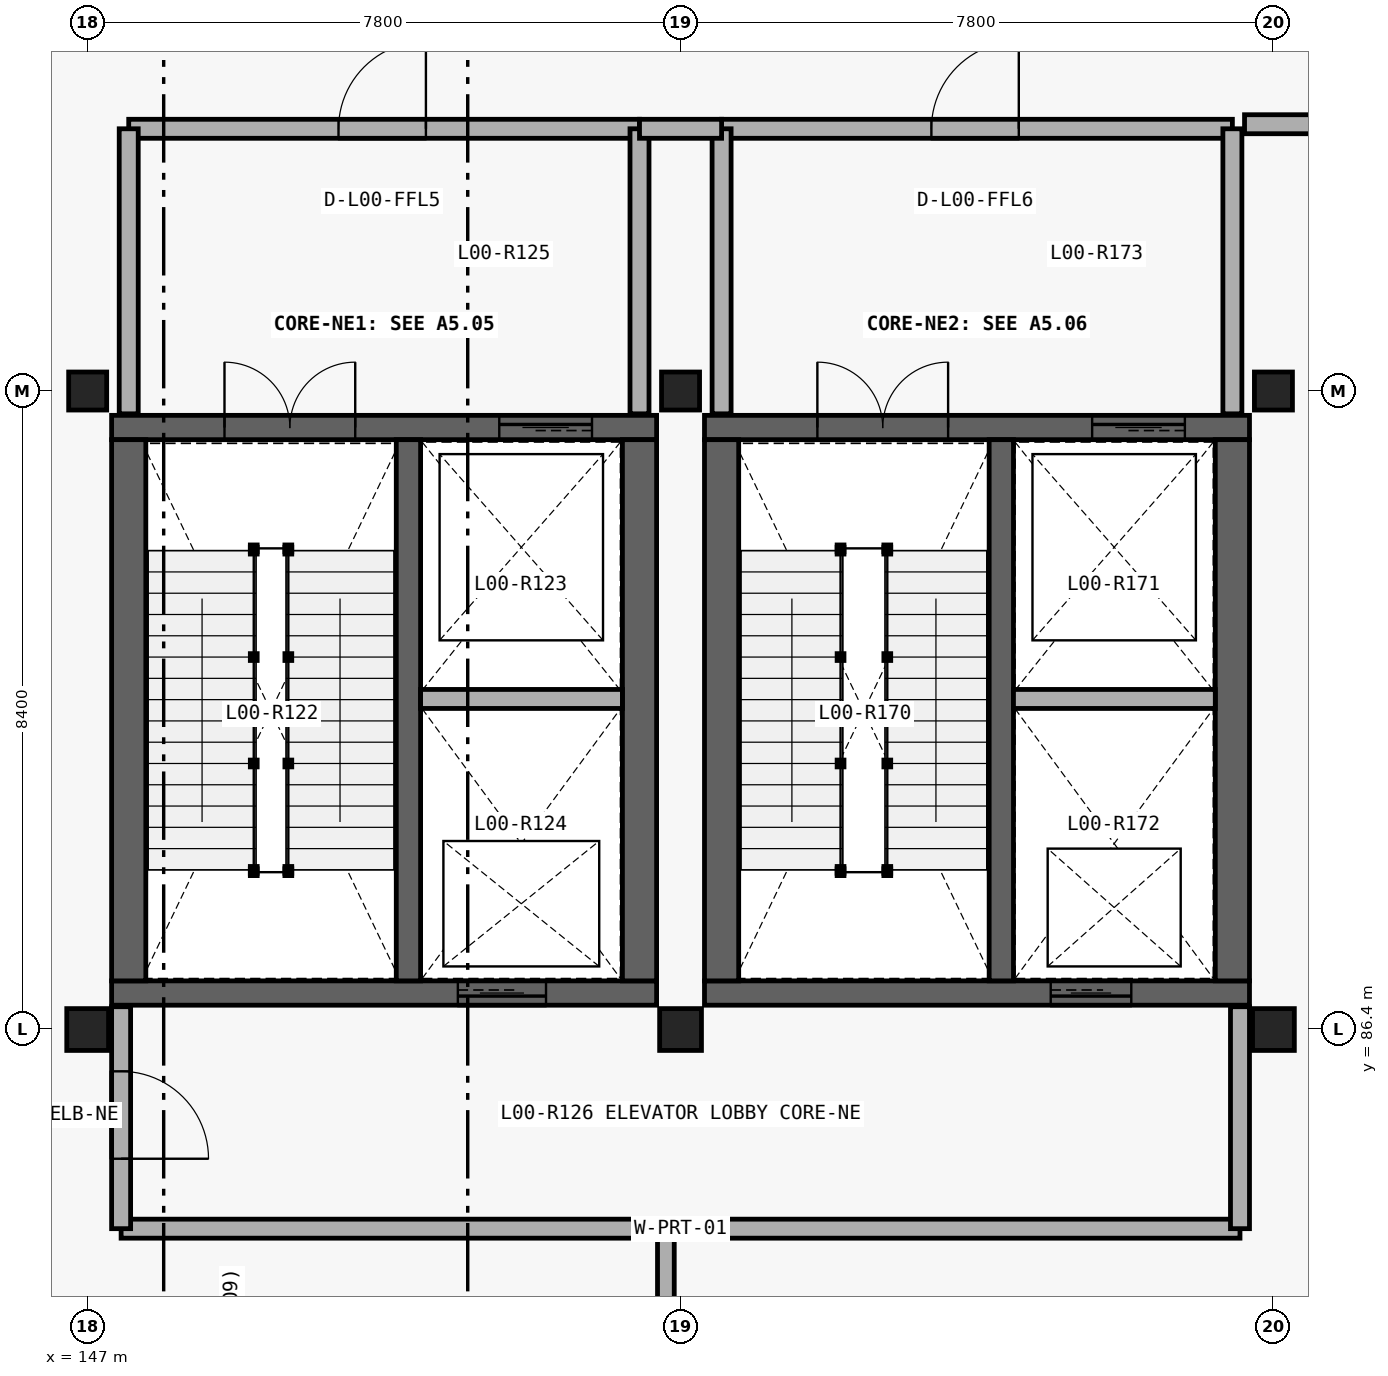
"""IFC4 building model, lengths in metres.
Left out: names, types, materials, properties, quantities, classifications, styles, units other than length and angle.
Written with IfcOpenShell. Run it as: python <this file> out.ifc"""

import sys

from ifc_helpers import new_model, si_unit, direction, frame, frame_2d, origin_with_axes, origin_2d_with_axis, place, context, subcontext, project, spatial, rectangle, i_section, extrude, element, fill, save


model = new_model("IFC4")
c1 = context("Model", 3, precision=1e-05, world=origin_with_axes(), true_north=direction((0.0, 1.0)))
c2 = subcontext(c1, "Body", "Model", "MODEL_VIEW")
j1 = project(units=[si_unit("LENGTHUNIT", "METRE"), si_unit("PLANEANGLEUNIT", "RADIAN")], contexts=[c1])
p1 = place(None, origin_with_axes())
s1 = spatial("IfcSite", under=j1, at=p1, CompositionType="ELEMENT")
p2 = place(p1, origin_with_axes())
s2 = spatial("IfcBuilding", under=s1, at=p2, CompositionType="ELEMENT")
p3 = place(p2, origin_with_axes())
s3 = spatial("IfcBuildingStorey", under=s2, at=p3, CompositionType="ELEMENT", Elevation=0.0)
p4 = place(None, frame((147.315, 86.88, 0.0), z_axis=(0.0, 0.0, 1.0), x_axis=(1.0, 0.0, 0.0)))
e1 = element("IfcWall", 1, at=p4, inside=s3, PredefinedType="SHEAR", context=c2, shape_type="SweptSolid", body=[
    extrude(rectangle(XDim=7.17, YDim=0.32, at=frame_2d((3.585, 0.0), x_axis=(1.0, 0.0))), origin_with_axes(), (0.0, 0.0, 1.0), 5.4),
])
p5 = place(None, frame((152.45, 86.88, 0.0), z_axis=(0.0, 0.0, 1.0), x_axis=(1.0, 0.0, 0.0)))
e2 = element("IfcOpeningElement", 2, at=p5, cuts=e1, PredefinedType="OPENING", context=c2, shape_type="SweptSolid", body=[
    extrude(rectangle(XDim=1.16, YDim=2.2, at=frame_2d((0.0, 1.1), x_axis=(1.0, 0.0))), frame((0.0, 0.17, 0.0), z_axis=(0.0, -1.0, 0.0), x_axis=(1.0, 0.0, 0.0)), (0.0, 0.0, 1.0), 0.34),
])
p6 = place(None, frame((154.485, 94.32, 0.0), z_axis=(0.0, 0.0, 1.0), x_axis=(-1.0, 0.0, 0.0)))
e3 = element("IfcWall", 3, at=p6, inside=s3, PredefinedType="SHEAR", context=c2, shape_type="SweptSolid", body=[
    extrude(rectangle(XDim=7.17, YDim=0.32, at=frame_2d((3.585, 0.0), x_axis=(1.0, 0.0))), origin_with_axes(), (0.0, 0.0, 1.0), 5.4),
])
p7 = place(None, frame((149.66, 94.32, 0.0), z_axis=(0.0, 0.0, 1.0), x_axis=(-1.0, 0.0, 0.0)))
e4 = element("IfcOpeningElement", 4, at=p7, cuts=e3, PredefinedType="OPENING", context=c2, shape_type="SweptSolid", body=[
    extrude(rectangle(XDim=1.72, YDim=2.18, at=frame_2d((0.0, 1.09), x_axis=(1.0, 0.0))), frame((0.0, 0.17, 0.0), z_axis=(0.0, -1.0, 0.0), x_axis=(1.0, 0.0, 0.0)), (0.0, 0.0, 1.0), 0.34),
])
p8 = place(None, frame((153.025, 94.32, 0.0), z_axis=(0.0, 0.0, 1.0), x_axis=(-1.0, 0.0, 0.0)))
e5 = element("IfcOpeningElement", 5, at=p8, cuts=e3, PredefinedType="OPENING", context=c2, shape_type="SweptSolid", body=[
    extrude(rectangle(XDim=1.22, YDim=2.28, at=frame_2d((0.0, 1.14), x_axis=(1.0, 0.0))), frame((0.0, 0.17, 0.0), z_axis=(0.0, -1.0, 0.0), x_axis=(1.0, 0.0, 0.0)), (0.0, 0.0, 1.0), 0.34),
])
for number, where, z_axis, x_axis in (
    (6, (154.26, 87.04, 0.0), (0.0, 0.0, 1.0), (0.0, 1.0, 0.0)),
    (7, (147.54, 94.16, 0.0), (0.0, 0.0, 1.0), (0.0, -1.0, 0.0)),
):
    element("IfcWall", number, at=place(None, frame(where, z_axis=z_axis, x_axis=x_axis)), inside=s3, PredefinedType="SHEAR", context=c2, shape_type="SweptSolid", body=[
        extrude(rectangle(XDim=7.12, YDim=0.45, at=frame_2d((3.56, 0.0), x_axis=(1.0, 0.0))), origin_with_axes(), (0.0, 0.0, 1.0), 5.4),
    ])
p9 = place(None, frame((151.22, 87.04, 0.0), z_axis=(0.0, 0.0, 1.0), x_axis=(0.0, 1.0, 0.0)))
e8 = element("IfcWall", 8, at=p9, inside=s3, PredefinedType="SHEAR", context=c2, shape_type="SweptSolid", body=[
    extrude(rectangle(XDim=7.12, YDim=0.32, at=frame_2d((3.56, 0.0), x_axis=(1.0, 0.0))), origin_with_axes(), (0.0, 0.0, 1.0), 5.4),
])
p10 = place(None, frame((151.38, 90.749, 0.0), z_axis=(0.0, 0.0, 1.0), x_axis=(1.0, 0.0, 0.0)))
e9 = element("IfcWall", 9, at=p10, inside=s3, PredefinedType="PARTITIONING", context=c2, shape_type="SweptSolid", body=[
    extrude(rectangle(XDim=2.655, YDim=0.25, at=frame_2d((1.327, 0.0), x_axis=(1.0, 0.0))), origin_with_axes(), (0.0, 0.0, 1.0), 5.08),
])
p11 = place(None, frame((154.26, 98.25, 0.0), z_axis=(0.0, 0.0, 1.0), x_axis=(-1.0, 0.0, 0.0)))
e10 = element("IfcWall", 10, at=p11, inside=s3, PredefinedType="PARTITIONING", context=c2, shape_type="SweptSolid", body=[
    extrude(rectangle(XDim=6.72, YDim=0.25, at=frame_2d((3.36, 0.0), x_axis=(1.0, 0.0))), origin_with_axes(), (0.0, 0.0, 1.0), 5.08),
])
p12 = place(None, frame((150.875, 98.25, 0.0), z_axis=(0.0, 0.0, 1.0), x_axis=(-1.0, 0.0, 0.0)))
e11 = element("IfcOpeningElement", 11, at=p12, cuts=e10, PredefinedType="OPENING", context=c2, shape_type="SweptSolid", body=[
    extrude(rectangle(XDim=1.15, YDim=2.25, at=frame_2d((0.0, 1.125), x_axis=(1.0, 0.0))), frame((0.0, 0.135, 0.0), z_axis=(0.0, -1.0, 0.0), x_axis=(1.0, 0.0, 0.0)), (0.0, 0.0, 1.0), 0.27),
])
for number, where, z_axis, x_axis in (
    (12, (147.54, 94.5, 0.0), (0.0, 0.0, 1.0), (0.0, 1.0, 0.0)),
    (13, (154.26, 94.5, 0.0), (0.0, 0.0, 1.0), (0.0, 1.0, 0.0)),
):
    element("IfcWall", number, at=place(None, frame(where, z_axis=z_axis, x_axis=x_axis)), inside=s3, PredefinedType="PARTITIONING", context=c2, shape_type="SweptSolid", body=[
        extrude(rectangle(XDim=3.75, YDim=0.25, at=frame_2d((1.875, 0.0), x_axis=(1.0, 0.0))), origin_with_axes(), (0.0, 0.0, 1.0), 5.08),
    ])
p13 = place(None, frame((147.44, 83.78, 0.0), z_axis=(0.0, 0.0, 1.0), x_axis=(1.0, 0.0, 0.0)))
e14 = element("IfcWall", 14, at=p13, inside=s3, PredefinedType="PARTITIONING", context=c2, shape_type="SweptSolid", body=[
    extrude(rectangle(XDim=14.72, YDim=0.25, at=frame_2d((7.36, 0.0), x_axis=(1.0, 0.0))), origin_with_axes(), (0.0, 0.0, 1.0), 4.732),
])
p14 = place(None, frame((162.16, 83.78, 0.0), z_axis=(0.0, 0.0, 1.0), x_axis=(0.0, 1.0, 0.0)))
e15 = element("IfcWall", 15, at=p14, inside=s3, PredefinedType="PARTITIONING", context=c2, shape_type="SweptSolid", body=[
    extrude(rectangle(XDim=2.92, YDim=0.25, at=frame_2d((1.46, 0.0), x_axis=(1.0, 0.0))), origin_with_axes(), (0.0, 0.0, 1.0), 5.08),
])
p15 = place(None, frame((147.44, 86.7, 0.0), z_axis=(0.0, 0.0, 1.0), x_axis=(0.0, -1.0, 0.0)))
e16 = element("IfcWall", 16, at=p15, inside=s3, PredefinedType="PARTITIONING", context=c2, shape_type="SweptSolid", body=[
    extrude(rectangle(XDim=2.92, YDim=0.25, at=frame_2d((1.46, 0.0), x_axis=(1.0, 0.0))), origin_with_axes(), (0.0, 0.0, 1.0), 5.08),
])
p16 = place(None, frame((147.44, 85.275, 0.0), z_axis=(0.0, 0.0, 1.0), x_axis=(0.0, -1.0, 0.0)))
e17 = element("IfcOpeningElement", 17, at=p16, cuts=e16, PredefinedType="OPENING", context=c2, shape_type="SweptSolid", body=[
    extrude(rectangle(XDim=1.15, YDim=2.25, at=frame_2d((0.0, 1.125), x_axis=(1.0, 0.0))), frame((0.0, 0.135, 0.0), z_axis=(0.0, -1.0, 0.0), x_axis=(1.0, 0.0, 0.0)), (0.0, 0.0, 1.0), 0.27),
])
p17 = place(None, frame((155.115, 86.88, 0.0), z_axis=(0.0, 0.0, 1.0), x_axis=(1.0, 0.0, 0.0)))
e18 = element("IfcWall", 18, at=p17, inside=s3, PredefinedType="SHEAR", context=c2, shape_type="SweptSolid", body=[
    extrude(rectangle(XDim=7.17, YDim=0.32, at=frame_2d((3.585, 0.0), x_axis=(1.0, 0.0))), origin_with_axes(), (0.0, 0.0, 1.0), 5.4),
])
p18 = place(None, frame((160.2, 86.88, 0.0), z_axis=(0.0, 0.0, 1.0), x_axis=(1.0, 0.0, 0.0)))
e19 = element("IfcOpeningElement", 19, at=p18, cuts=e18, PredefinedType="OPENING", context=c2, shape_type="SweptSolid", body=[
    extrude(rectangle(XDim=1.06, YDim=2.16, at=frame_2d((0.0, 1.08), x_axis=(1.0, 0.0))), frame((0.0, 0.17, 0.0), z_axis=(0.0, -1.0, 0.0), x_axis=(1.0, 0.0, 0.0)), (0.0, 0.0, 1.0), 0.34),
])
p19 = place(None, frame((162.285, 94.32, 0.0), z_axis=(0.0, 0.0, 1.0), x_axis=(-1.0, 0.0, 0.0)))
e20 = element("IfcWall", 20, at=p19, inside=s3, PredefinedType="SHEAR", context=c2, shape_type="SweptSolid", body=[
    extrude(rectangle(XDim=7.17, YDim=0.32, at=frame_2d((3.585, 0.0), x_axis=(1.0, 0.0))), origin_with_axes(), (0.0, 0.0, 1.0), 5.4),
])
p20 = place(None, frame((157.46, 94.32, 0.0), z_axis=(0.0, 0.0, 1.0), x_axis=(-1.0, 0.0, 0.0)))
e21 = element("IfcOpeningElement", 21, at=p20, cuts=e20, PredefinedType="OPENING", context=c2, shape_type="SweptSolid", body=[
    extrude(rectangle(XDim=1.72, YDim=2.18, at=frame_2d((0.0, 1.09), x_axis=(1.0, 0.0))), frame((0.0, 0.17, 0.0), z_axis=(0.0, -1.0, 0.0), x_axis=(1.0, 0.0, 0.0)), (0.0, 0.0, 1.0), 0.34),
])
p21 = place(None, frame((160.825, 94.32, 0.0), z_axis=(0.0, 0.0, 1.0), x_axis=(-1.0, 0.0, 0.0)))
e22 = element("IfcOpeningElement", 22, at=p21, cuts=e20, PredefinedType="OPENING", context=c2, shape_type="SweptSolid", body=[
    extrude(rectangle(XDim=1.22, YDim=2.28, at=frame_2d((0.0, 1.14), x_axis=(1.0, 0.0))), frame((0.0, 0.17, 0.0), z_axis=(0.0, -1.0, 0.0), x_axis=(1.0, 0.0, 0.0)), (0.0, 0.0, 1.0), 0.34),
])
for number, where, z_axis, x_axis in (
    (23, (162.06, 87.04, 0.0), (0.0, 0.0, 1.0), (0.0, 1.0, 0.0)),
    (24, (155.34, 94.16, 0.0), (0.0, 0.0, 1.0), (0.0, -1.0, 0.0)),
):
    element("IfcWall", number, at=place(None, frame(where, z_axis=z_axis, x_axis=x_axis)), inside=s3, PredefinedType="SHEAR", context=c2, shape_type="SweptSolid", body=[
        extrude(rectangle(XDim=7.12, YDim=0.45, at=frame_2d((3.56, 0.0), x_axis=(1.0, 0.0))), origin_with_axes(), (0.0, 0.0, 1.0), 5.4),
    ])
p22 = place(None, frame((159.02, 87.04, 0.0), z_axis=(0.0, 0.0, 1.0), x_axis=(0.0, 1.0, 0.0)))
e25 = element("IfcWall", 25, at=p22, inside=s3, PredefinedType="SHEAR", context=c2, shape_type="SweptSolid", body=[
    extrude(rectangle(XDim=7.12, YDim=0.32, at=frame_2d((3.56, 0.0), x_axis=(1.0, 0.0))), origin_with_axes(), (0.0, 0.0, 1.0), 5.4),
])
p23 = place(None, frame((159.18, 90.749, 0.0), z_axis=(0.0, 0.0, 1.0), x_axis=(1.0, 0.0, 0.0)))
e26 = element("IfcWall", 26, at=p23, inside=s3, PredefinedType="PARTITIONING", context=c2, shape_type="SweptSolid", body=[
    extrude(rectangle(XDim=2.655, YDim=0.25, at=frame_2d((1.327, 0.0), x_axis=(1.0, 0.0))), origin_with_axes(), (0.0, 0.0, 1.0), 5.08),
])
p24 = place(None, frame((162.06, 98.25, 0.0), z_axis=(0.0, 0.0, 1.0), x_axis=(-1.0, 0.0, 0.0)))
e27 = element("IfcWall", 27, at=p24, inside=s3, PredefinedType="PARTITIONING", context=c2, shape_type="SweptSolid", body=[
    extrude(rectangle(XDim=6.72, YDim=0.25, at=frame_2d((3.36, 0.0), x_axis=(1.0, 0.0))), origin_with_axes(), (0.0, 0.0, 1.0), 5.08),
])
p25 = place(None, frame((158.675, 98.25, 0.0), z_axis=(0.0, 0.0, 1.0), x_axis=(-1.0, 0.0, 0.0)))
e28 = element("IfcOpeningElement", 28, at=p25, cuts=e27, PredefinedType="OPENING", context=c2, shape_type="SweptSolid", body=[
    extrude(rectangle(XDim=1.15, YDim=2.25, at=frame_2d((0.0, 1.125), x_axis=(1.0, 0.0))), frame((0.0, 0.135, 0.0), z_axis=(0.0, -1.0, 0.0), x_axis=(1.0, 0.0, 0.0)), (0.0, 0.0, 1.0), 0.27),
])
for number, where, z_axis, x_axis in (
    (29, (155.34, 94.5, 0.0), (0.0, 0.0, 1.0), (0.0, 1.0, 0.0)),
    (30, (162.06, 94.5, 0.0), (0.0, 0.0, 1.0), (0.0, 1.0, 0.0)),
):
    element("IfcWall", number, at=place(None, frame(where, z_axis=z_axis, x_axis=x_axis)), inside=s3, PredefinedType="PARTITIONING", context=c2, shape_type="SweptSolid", body=[
        extrude(rectangle(XDim=3.75, YDim=0.25, at=frame_2d((1.875, 0.0), x_axis=(1.0, 0.0))), origin_with_axes(), (0.0, 0.0, 1.0), 5.08),
    ])
p26 = place(None, frame((154.26, 98.25, 0.0), z_axis=(0.0, 0.0, 1.0), x_axis=(1.0, 0.0, 0.0)))
e31 = element("IfcWall", 31, at=p26, inside=s3, PredefinedType="PARTITIONING", context=c2, shape_type="SweptSolid", body=[
    extrude(rectangle(XDim=1.08, YDim=0.25, at=frame_2d((0.54, 0.0), x_axis=(1.0, 0.0))), origin_with_axes(), (0.0, 0.0, 1.0), 5.08),
])
p27 = place(None, frame((162.22, 98.31, 0.0), z_axis=(0.0, 0.0, 1.0), x_axis=(1.0, 0.0, 0.0)))
e32 = element("IfcWall", 32, at=p27, inside=s3, PredefinedType="PARTITIONING", context=c2, shape_type="SweptSolid", body=[
    extrude(rectangle(XDim=7.04, YDim=0.25, at=frame_2d((3.52, 0.0), x_axis=(1.0, 0.0))), origin_with_axes(), (0.0, 0.0, 1.0), 5.08),
])
p28 = place(None, frame((164.242, 98.31, 0.0), z_axis=(0.0, 0.0, 1.0), x_axis=(1.0, 0.0, 0.0)))
e33 = element("IfcOpeningElement", 33, at=p28, cuts=e32, PredefinedType="OPENING", context=c2, shape_type="SweptSolid", body=[
    extrude(rectangle(XDim=1.56, YDim=2.28, at=frame_2d((0.0, 1.14), x_axis=(1.0, 0.0))), frame((0.0, 0.135, 0.0), z_axis=(0.0, -1.0, 0.0), x_axis=(1.0, 0.0, 0.0)), (0.0, 0.0, 1.0), 0.27),
])
p29 = place(None, frame((167.438, 98.31, 0.0), z_axis=(0.0, 0.0, 1.0), x_axis=(1.0, 0.0, 0.0)))
e34 = element("IfcOpeningElement", 34, at=p29, cuts=e32, PredefinedType="OPENING", context=c2, shape_type="SweptSolid", body=[
    extrude(rectangle(XDim=0.91, YDim=2.12, at=frame_2d((0.0, 1.06), x_axis=(1.0, 0.0))), frame((0.0, 0.135, 0.0), z_axis=(0.0, -1.0, 0.0), x_axis=(1.0, 0.0, 0.0)), (0.0, 0.0, 1.0), 0.27),
])
p30 = place(None, frame((154.607, 61.94, 0.0), z_axis=(0.0, 0.0, 1.0), x_axis=(0.0, 1.0, 0.0)))
e35 = element("IfcWall", 35, at=p30, inside=s3, PredefinedType="PARTITIONING", context=c2, shape_type="SweptSolid", body=[
    extrude(rectangle(XDim=21.72, YDim=0.22, at=frame_2d((10.86, 0.0), x_axis=(1.0, 0.0))), origin_with_axes(), (0.0, 0.0, 1.0), 4.161),
])
p31 = place(None, frame((147.0, 86.4, 0.0), z_axis=(0.0, 0.0, 1.0), x_axis=(1.0, 0.0, 0.0)))
e36 = element("IfcColumn", 36, at=p31, inside=s3, PredefinedType="COLUMN", context=c2, shape_type="SweptSolid", body=[
    extrude(i_section(OverallWidth=0.55, OverallDepth=0.55, WebThickness=0.025, FlangeThickness=0.042, at=origin_2d_with_axis()), origin_with_axes(), (0.0, 0.0, 1.0), 5.4),
])
p32 = place(None, frame((147.0, 94.8, 0.0), z_axis=(0.0, 0.0, 1.0), x_axis=(1.0, 0.0, 0.0)))
e37 = element("IfcColumn", 37, at=p32, inside=s3, PredefinedType="COLUMN", context=c2, shape_type="SweptSolid", body=[
    extrude(i_section(OverallWidth=0.5, OverallDepth=0.5, WebThickness=0.022, FlangeThickness=0.036, at=origin_2d_with_axis()), origin_with_axes(), (0.0, 0.0, 1.0), 5.4),
])
p33 = place(None, frame((154.8, 86.4, 0.0), z_axis=(0.0, 0.0, 1.0), x_axis=(1.0, 0.0, 0.0)))
e38 = element("IfcColumn", 38, at=p33, inside=s3, PredefinedType="COLUMN", context=c2, shape_type="SweptSolid", body=[
    extrude(i_section(OverallWidth=0.55, OverallDepth=0.55, WebThickness=0.025, FlangeThickness=0.042, at=origin_2d_with_axis()), origin_with_axes(), (0.0, 0.0, 1.0), 5.4),
])
p34 = place(None, frame((154.8, 94.8, 0.0), z_axis=(0.0, 0.0, 1.0), x_axis=(1.0, 0.0, 0.0)))
e39 = element("IfcColumn", 39, at=p34, inside=s3, PredefinedType="COLUMN", context=c2, shape_type="SweptSolid", body=[
    extrude(i_section(OverallWidth=0.5, OverallDepth=0.5, WebThickness=0.022, FlangeThickness=0.036, at=origin_2d_with_axis()), origin_with_axes(), (0.0, 0.0, 1.0), 5.4),
])
p35 = place(None, frame((162.6, 86.4, 0.0), z_axis=(0.0, 0.0, 1.0), x_axis=(1.0, 0.0, 0.0)))
e40 = element("IfcColumn", 40, at=p35, inside=s3, PredefinedType="COLUMN", context=c2, shape_type="SweptSolid", body=[
    extrude(i_section(OverallWidth=0.55, OverallDepth=0.55, WebThickness=0.025, FlangeThickness=0.042, at=origin_2d_with_axis()), origin_with_axes(), (0.0, 0.0, 1.0), 5.4),
])
p36 = place(None, frame((162.6, 94.8, 0.0), z_axis=(0.0, 0.0, 1.0), x_axis=(1.0, 0.0, 0.0)))
e41 = element("IfcColumn", 41, at=p36, inside=s3, PredefinedType="COLUMN", context=c2, shape_type="SweptSolid", body=[
    extrude(i_section(OverallWidth=0.5, OverallDepth=0.5, WebThickness=0.022, FlangeThickness=0.036, at=origin_2d_with_axis()), origin_with_axes(), (0.0, 0.0, 1.0), 5.4),
])
p37 = place(None, frame((149.66, 94.32, 0.0), z_axis=(0.0, 0.0, 1.0), x_axis=(1.0, 0.0, 0.0)))
e42 = element("IfcDoor", 42, at=p37, inside=s3, OperationType="DOUBLE_DOOR_SINGLE_SWING", PredefinedType="DOOR", context=c2, shape_type="SweptSolid", body=[
    extrude(rectangle(XDim=1.72, YDim=2.18, at=frame_2d((0.0, 1.09), x_axis=(1.0, 0.0))), frame((0.0, 0.04, 0.0), z_axis=(0.0, -1.0, 0.0), x_axis=(1.0, 0.0, 0.0)), (0.0, 0.0, 1.0), 0.08),
])
fill(e4, e42)
p38 = place(None, frame((153.025, 94.32, 0.0), z_axis=(0.0, 0.0, 1.0), x_axis=(1.0, 0.0, 0.0)))
e43 = element("IfcDoor", 43, at=p38, inside=s3, OperationType="SLIDING_TO_LEFT", PredefinedType="DOOR", context=c2, shape_type="SweptSolid", body=[
    extrude(rectangle(XDim=1.22, YDim=2.28, at=frame_2d((0.0, 1.14), x_axis=(1.0, 0.0))), frame((0.0, 0.04, 0.0), z_axis=(0.0, -1.0, 0.0), x_axis=(1.0, 0.0, 0.0)), (0.0, 0.0, 1.0), 0.08),
])
fill(e5, e43)
p39 = place(None, frame((152.45, 86.88, 0.0), z_axis=(0.0, 0.0, 1.0), x_axis=(-1.0, 0.0, 0.0)))
e44 = element("IfcDoor", 44, at=p39, inside=s3, OperationType="SLIDING_TO_LEFT", PredefinedType="DOOR", context=c2, shape_type="SweptSolid", body=[
    extrude(rectangle(XDim=1.16, YDim=2.2, at=frame_2d((0.0, 1.1), x_axis=(1.0, 0.0))), frame((0.0, 0.04, 0.0), z_axis=(0.0, -1.0, 0.0), x_axis=(1.0, 0.0, 0.0)), (0.0, 0.0, 1.0), 0.08),
])
fill(e2, e44)
p40 = place(None, frame((150.875, 98.25, 0.0), z_axis=(0.0, 0.0, 1.0), x_axis=(1.0, 0.0, 0.0)))
e45 = element("IfcDoor", 45, at=p40, inside=s3, OperationType="SINGLE_SWING_LEFT", PredefinedType="DOOR", context=c2, shape_type="SweptSolid", body=[
    extrude(rectangle(XDim=1.15, YDim=2.25, at=frame_2d((0.0, 1.125), x_axis=(1.0, 0.0))), frame((0.0, 0.04, 0.0), z_axis=(0.0, -1.0, 0.0), x_axis=(1.0, 0.0, 0.0)), (0.0, 0.0, 1.0), 0.08),
])
fill(e11, e45)
p41 = place(None, frame((147.44, 85.275, 0.0), z_axis=(0.0, 0.0, 1.0), x_axis=(0.0, -1.0, 0.0)))
e46 = element("IfcDoor", 46, at=p41, inside=s3, OperationType="SINGLE_SWING_RIGHT", PredefinedType="DOOR", context=c2, shape_type="SweptSolid", body=[
    extrude(rectangle(XDim=1.15, YDim=2.25, at=frame_2d((0.0, 1.125), x_axis=(1.0, 0.0))), frame((0.0, 0.04, 0.0), z_axis=(0.0, -1.0, 0.0), x_axis=(1.0, 0.0, 0.0)), (0.0, 0.0, 1.0), 0.08),
])
fill(e17, e46)
p42 = place(None, frame((157.46, 94.32, 0.0), z_axis=(0.0, 0.0, 1.0), x_axis=(1.0, 0.0, 0.0)))
e47 = element("IfcDoor", 47, at=p42, inside=s3, OperationType="DOUBLE_DOOR_SINGLE_SWING", PredefinedType="DOOR", context=c2, shape_type="SweptSolid", body=[
    extrude(rectangle(XDim=1.72, YDim=2.18, at=frame_2d((0.0, 1.09), x_axis=(1.0, 0.0))), frame((0.0, 0.04, 0.0), z_axis=(0.0, -1.0, 0.0), x_axis=(1.0, 0.0, 0.0)), (0.0, 0.0, 1.0), 0.08),
])
fill(e21, e47)
p43 = place(None, frame((160.825, 94.32, 0.0), z_axis=(0.0, 0.0, 1.0), x_axis=(1.0, 0.0, 0.0)))
e48 = element("IfcDoor", 48, at=p43, inside=s3, OperationType="SLIDING_TO_LEFT", PredefinedType="DOOR", context=c2, shape_type="SweptSolid", body=[
    extrude(rectangle(XDim=1.22, YDim=2.28, at=frame_2d((0.0, 1.14), x_axis=(1.0, 0.0))), frame((0.0, 0.04, 0.0), z_axis=(0.0, -1.0, 0.0), x_axis=(1.0, 0.0, 0.0)), (0.0, 0.0, 1.0), 0.08),
])
fill(e22, e48)
p44 = place(None, frame((160.2, 86.88, 0.0), z_axis=(0.0, 0.0, 1.0), x_axis=(-1.0, 0.0, 0.0)))
e49 = element("IfcDoor", 49, at=p44, inside=s3, OperationType="SLIDING_TO_LEFT", PredefinedType="DOOR", context=c2, shape_type="SweptSolid", body=[
    extrude(rectangle(XDim=1.06, YDim=2.16, at=frame_2d((0.0, 1.08), x_axis=(1.0, 0.0))), frame((0.0, 0.04, 0.0), z_axis=(0.0, -1.0, 0.0), x_axis=(1.0, 0.0, 0.0)), (0.0, 0.0, 1.0), 0.08),
])
fill(e19, e49)
p45 = place(None, frame((158.675, 98.25, 0.0), z_axis=(0.0, 0.0, 1.0), x_axis=(1.0, 0.0, 0.0)))
e50 = element("IfcDoor", 50, at=p45, inside=s3, OperationType="SINGLE_SWING_LEFT", PredefinedType="DOOR", context=c2, shape_type="SweptSolid", body=[
    extrude(rectangle(XDim=1.15, YDim=2.25, at=frame_2d((0.0, 1.125), x_axis=(1.0, 0.0))), frame((0.0, 0.04, 0.0), z_axis=(0.0, -1.0, 0.0), x_axis=(1.0, 0.0, 0.0)), (0.0, 0.0, 1.0), 0.08),
])
fill(e28, e50)
save(model, sys.argv[1])
